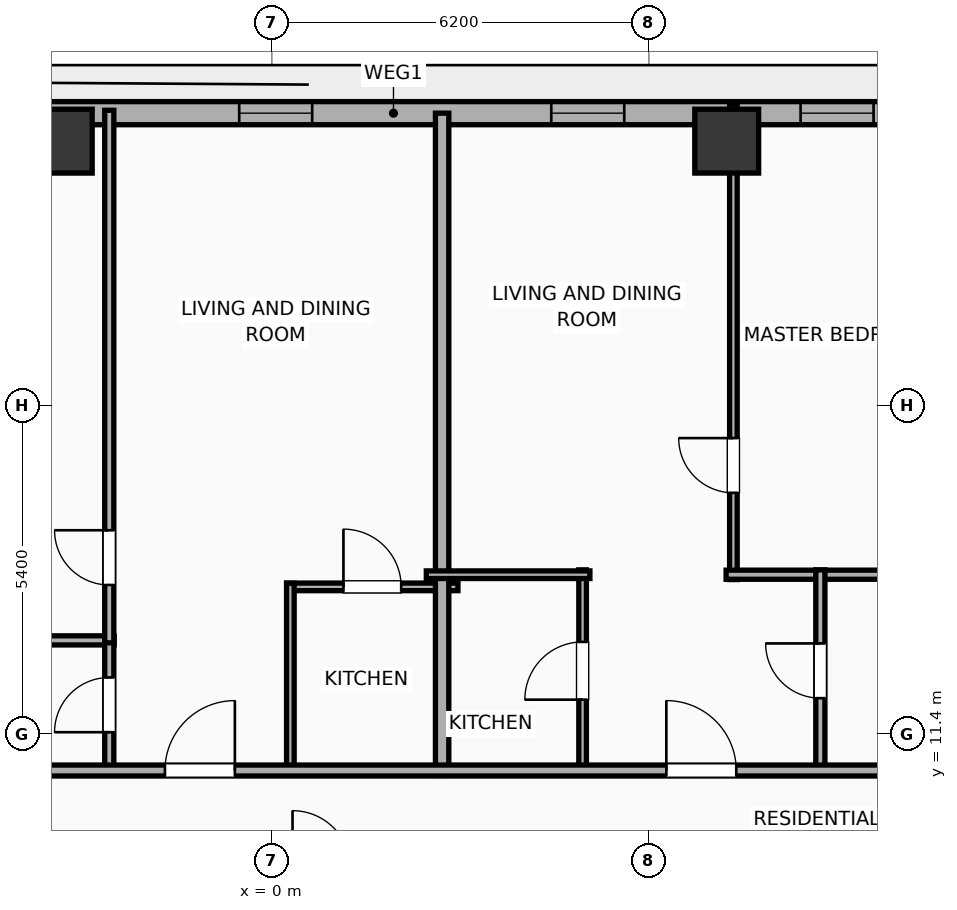
"""IFC4 building model, lengths in metres.
Left out: names, types, materials, properties, quantities, classifications, styles, units other than length and angle.
Written with IfcOpenShell. Run it as: python <this file> out.ifc"""

import sys

from ifc_helpers import new_model, si_unit, direction, frame, frame_2d, origin, origin_2d, place, context, subcontext, project, spatial, rectangle, hollow_rectangle, extrude, element, fill, save


model = new_model("IFC4")
c1 = context("Model", 3, precision=1e-05, world=origin(), true_north=direction((0.0, 1.0)))
c2 = subcontext(c1, "Body", "Model", "MODEL_VIEW")
j1 = project(units=[si_unit("LENGTHUNIT", "METRE"), si_unit("PLANEANGLEUNIT", "RADIAN")], contexts=[c1])
p1 = place(None, origin())
s1 = spatial("IfcSite", under=j1, at=p1, CompositionType="ELEMENT")
p2 = place(p1, origin())
s2 = spatial("IfcBuilding", under=s1, at=p2, CompositionType="ELEMENT")
p3 = place(p2, frame((0.0, 0.0, 85.8)))
s3 = spatial("IfcBuildingStorey", under=s2, at=p3, CompositionType="ELEMENT", Elevation=85.8)
for number, where, z_axis, x_axis in (
    (1, (7.48, 21.15, -0.4), (0.0, 0.0, 1.0), (1.0, 0.0, 0.0)),
    (2, (-3.48, 21.15, -0.4), (0.0, 0.0, 1.0), (1.0, 0.0, 0.0)),
):
    element("IfcColumn", number, at=place(p3, frame(where, z_axis=z_axis, x_axis=x_axis)), inside=s3, PredefinedType="COLUMN", context=c2, shape_type="SweptSolid", body=[
        extrude(hollow_rectangle(XDim=1.05, YDim=1.05, WallThickness=0.036, at=origin_2d()), origin(), (0.0, 0.0, 1.0), 4.3),
    ])
p4 = place(p3, frame((-25.381, 21.61, 0.0), z_axis=(0.0, 0.0, 1.0), x_axis=(1.0, 0.0, 0.0)))
e3 = element("IfcWall", 3, at=p4, inside=s3, PredefinedType="ELEMENTEDWALL", context=c2, shape_type="SweptSolid", body=[
    extrude(rectangle(XDim=54.763, YDim=0.38, at=frame_2d((27.381, 0.0))), origin(), (0.0, 0.0, 1.0), 2.54),
])
p5 = place(p4, frame((5.645, 0.0, 0.75)))
e4 = element("IfcOpeningElement", 4, at=p5, cuts=e3, PredefinedType="OPENING", context=c2, shape_type="SweptSolid", body=[
    extrude(rectangle(XDim=2.4, YDim=1.45, at=frame_2d((1.2, 0.725))), frame((0.0, 0.2, 0.0), z_axis=(0.0, -1.0, 0.0), x_axis=(1.0, 0.0, 0.0)), (0.0, 0.0, 1.0), 0.4),
])
p6 = place(p4, frame((47.567, 0.0, 0.75)))
e5 = element("IfcOpeningElement", 5, at=p6, cuts=e3, PredefinedType="OPENING", context=c2, shape_type="SweptSolid", body=[
    extrude(rectangle(XDim=2.4, YDim=1.45, at=frame_2d((1.2, 0.725))), frame((0.0, 0.2, 0.0), z_axis=(0.0, -1.0, 0.0), x_axis=(1.0, 0.0, 0.0)), (0.0, 0.0, 1.0), 0.4),
])
p7 = place(p4, frame((1.635, 0.0, 0.55)))
e6 = element("IfcOpeningElement", 6, at=p7, cuts=e3, PredefinedType="OPENING", context=c2, shape_type="SweptSolid", body=[
    extrude(rectangle(XDim=1.2, YDim=1.15, at=frame_2d((0.6, 0.575))), frame((0.0, 0.2, 0.0), z_axis=(0.0, -1.0, 0.0), x_axis=(1.0, 0.0, 0.0)), (0.0, 0.0, 1.0), 0.4),
])
p8 = place(p4, frame((8.996, 0.0, 0.55)))
e7 = element("IfcOpeningElement", 7, at=p8, cuts=e3, PredefinedType="OPENING", context=c2, shape_type="SweptSolid", body=[
    extrude(rectangle(XDim=1.2, YDim=1.15, at=frame_2d((0.6, 0.575))), frame((0.0, 0.2, 0.0), z_axis=(0.0, -1.0, 0.0), x_axis=(1.0, 0.0, 0.0)), (0.0, 0.0, 1.0), 0.4),
])
p9 = place(p4, frame((13.576, 0.0, 0.55)))
e8 = element("IfcOpeningElement", 8, at=p9, cuts=e3, PredefinedType="OPENING", context=c2, shape_type="SweptSolid", body=[
    extrude(rectangle(XDim=1.2, YDim=1.15, at=frame_2d((0.6, 0.575))), frame((0.0, 0.2, 0.0), z_axis=(0.0, -1.0, 0.0), x_axis=(1.0, 0.0, 0.0)), (0.0, 0.0, 1.0), 0.4),
])
p10 = place(p4, frame((17.676, 0.0, 0.55)))
e9 = element("IfcOpeningElement", 9, at=p10, cuts=e3, PredefinedType="OPENING", context=c2, shape_type="SweptSolid", body=[
    extrude(rectangle(XDim=1.2, YDim=1.15, at=frame_2d((0.6, 0.575))), frame((0.0, 0.2, 0.0), z_axis=(0.0, -1.0, 0.0), x_axis=(1.0, 0.0, 0.0)), (0.0, 0.0, 1.0), 0.4),
])
p11 = place(p4, frame((20.319, 0.0, 0.55)))
e10 = element("IfcOpeningElement", 10, at=p11, cuts=e3, PredefinedType="OPENING", context=c2, shape_type="SweptSolid", body=[
    extrude(rectangle(XDim=0.85, YDim=1.15, at=frame_2d((0.425, 0.575))), frame((0.0, 0.2, 0.0), z_axis=(0.0, -1.0, 0.0), x_axis=(1.0, 0.0, 0.0)), (0.0, 0.0, 1.0), 0.4),
])
p12 = place(p4, frame((24.844, 0.0, 0.55)))
e11 = element("IfcOpeningElement", 11, at=p12, cuts=e3, PredefinedType="OPENING", context=c2, shape_type="SweptSolid", body=[
    extrude(rectangle(XDim=1.2, YDim=1.15, at=frame_2d((0.6, 0.575))), frame((0.0, 0.2, 0.0), z_axis=(0.0, -1.0, 0.0), x_axis=(1.0, 0.0, 0.0)), (0.0, 0.0, 1.0), 0.4),
])
p13 = place(p4, frame((29.976, 0.0, 0.55)))
e12 = element("IfcOpeningElement", 12, at=p13, cuts=e3, PredefinedType="OPENING", context=c2, shape_type="SweptSolid", body=[
    extrude(rectangle(XDim=1.2, YDim=1.15, at=frame_2d((0.6, 0.575))), frame((0.0, 0.2, 0.0), z_axis=(0.0, -1.0, 0.0), x_axis=(1.0, 0.0, 0.0)), (0.0, 0.0, 1.0), 0.4),
])
p14 = place(p4, frame((34.076, 0.0, 0.55)))
e13 = element("IfcOpeningElement", 13, at=p14, cuts=e3, PredefinedType="OPENING", context=c2, shape_type="SweptSolid", body=[
    extrude(rectangle(XDim=1.2, YDim=1.15, at=frame_2d((0.6, 0.575))), frame((0.0, 0.2, 0.0), z_axis=(0.0, -1.0, 0.0), x_axis=(1.0, 0.0, 0.0)), (0.0, 0.0, 1.0), 0.4),
])
p15 = place(p4, frame((38.176, 0.0, 0.55)))
e14 = element("IfcOpeningElement", 14, at=p15, cuts=e3, PredefinedType="OPENING", context=c2, shape_type="SweptSolid", body=[
    extrude(rectangle(XDim=1.2, YDim=1.15, at=frame_2d((0.6, 0.575))), frame((0.0, 0.2, 0.0), z_axis=(0.0, -1.0, 0.0), x_axis=(1.0, 0.0, 0.0)), (0.0, 0.0, 1.0), 0.4),
])
p16 = place(p4, frame((41.796, 0.0, 0.55)))
e15 = element("IfcOpeningElement", 15, at=p16, cuts=e3, PredefinedType="OPENING", context=c2, shape_type="SweptSolid", body=[
    extrude(rectangle(XDim=1.2, YDim=1.15, at=frame_2d((0.6, 0.575))), frame((0.0, 0.2, 0.0), z_axis=(0.0, -1.0, 0.0), x_axis=(1.0, 0.0, 0.0)), (0.0, 0.0, 1.0), 0.4),
])
p17 = place(p4, frame((45.336, 0.0, 0.55)))
e16 = element("IfcOpeningElement", 16, at=p17, cuts=e3, PredefinedType="OPENING", context=c2, shape_type="SweptSolid", body=[
    extrude(rectangle(XDim=1.2, YDim=1.15, at=frame_2d((0.6, 0.575))), frame((0.0, 0.2, 0.0), z_axis=(0.0, -1.0, 0.0), x_axis=(1.0, 0.0, 0.0)), (0.0, 0.0, 1.0), 0.4),
])
p18 = place(p4, frame((53.022, 0.0, 0.55)))
e17 = element("IfcOpeningElement", 17, at=p18, cuts=e3, PredefinedType="OPENING", context=c2, shape_type="SweptSolid", body=[
    extrude(rectangle(XDim=0.85, YDim=1.15, at=frame_2d((0.425, 0.575))), frame((0.0, 0.2, 0.0), z_axis=(0.0, -1.0, 0.0), x_axis=(1.0, 0.0, 0.0)), (0.0, 0.0, 1.0), 0.4),
])
p19 = place(p3, frame((-5.66, 12.94, 0.0), z_axis=(0.0, 0.0, 1.0), x_axis=(1.0, 0.0, 0.0)))
e18 = element("IfcWall", 18, at=p19, inside=s3, PredefinedType="PLUMBINGWALL", context=c2, shape_type="SweptSolid", body=[
    extrude(rectangle(XDim=3.066, YDim=0.15, at=frame_2d((1.533, 0.0))), origin(), (0.0, 0.0, 1.0), 3.65),
])
p20 = place(p3, frame((-2.674, 10.78, 0.0), z_axis=(0.0, 0.0, 1.0), x_axis=(0.0, 1.0, 0.0)))
e19 = element("IfcWall", 19, at=p20, inside=s3, PredefinedType="PLUMBINGWALL", context=c2, shape_type="SweptSolid", body=[
    extrude(rectangle(XDim=2.2, YDim=0.15, at=frame_2d((1.1, 0.0))), origin(), (0.0, 0.0, 1.0), 3.65),
])
p21 = place(p20, frame((0.65, 0.0, 0.0)))
e20 = element("IfcOpeningElement", 20, at=p21, cuts=e19, PredefinedType="OPENING", context=c2, shape_type="SweptSolid", body=[
    extrude(rectangle(XDim=0.9, YDim=2.05, at=frame_2d((0.45, 1.025))), frame((0.0, 0.085, 0.0), z_axis=(0.0, -1.0, 0.0), x_axis=(1.0, 0.0, 0.0)), (0.0, 0.0, 1.0), 0.17),
])
p22 = place(p3, frame((-2.674, 12.9, 0.0), z_axis=(0.0, 0.0, 1.0), x_axis=(0.0, 1.0, 0.0)))
e21 = element("IfcWall", 21, at=p22, inside=s3, PredefinedType="PLUMBINGWALL", context=c2, shape_type="SweptSolid", body=[
    extrude(rectangle(XDim=8.758, YDim=0.15, at=frame_2d((4.379, 0.0))), origin(), (0.0, 0.0, 1.0), 3.65),
])
p23 = place(p22, frame((0.951, 0.0, 0.0)))
e22 = element("IfcOpeningElement", 22, at=p23, cuts=e21, PredefinedType="OPENING", context=c2, shape_type="SweptSolid", body=[
    extrude(rectangle(XDim=0.9, YDim=2.05, at=frame_2d((0.45, 1.025))), frame((0.0, 0.085, 0.0), z_axis=(0.0, -1.0, 0.0), x_axis=(1.0, 0.0, 0.0)), (0.0, 0.0, 1.0), 0.17),
])
p24 = place(p3, frame((0.244, 13.82, 0.0), z_axis=(0.0, 0.0, 1.0), x_axis=(1.0, 0.0, 0.0)))
e23 = element("IfcWall", 23, at=p24, inside=s3, PredefinedType="PARTITIONING", context=c2, shape_type="SweptSolid", body=[
    extrude(rectangle(XDim=2.816, YDim=0.125, at=frame_2d((1.408, 0.0))), origin(), (0.0, 0.0, 1.0), 3.65),
])
p25 = place(p24, frame((0.933, 0.0, 0.0)))
e24 = element("IfcOpeningElement", 24, at=p25, cuts=e23, PredefinedType="OPENING", context=c2, shape_type="SweptSolid", body=[
    extrude(rectangle(XDim=0.95, YDim=2.05, at=frame_2d((0.475, 1.025))), frame((0.0, 0.073, 0.0), z_axis=(0.0, -1.0, 0.0), x_axis=(1.0, 0.0, 0.0)), (0.0, 0.0, 1.0), 0.145),
])
p26 = place(p3, frame((0.304, 10.78, 0.0), z_axis=(0.0, 0.0, 1.0), x_axis=(0.0, 1.0, 0.0)))
e25 = element("IfcWall", 25, at=p26, inside=s3, PredefinedType="PARTITIONING", context=c2, shape_type="SweptSolid", body=[
    extrude(rectangle(XDim=3.1, YDim=0.125, at=frame_2d((1.55, 0.0))), origin(), (0.0, 0.0, 1.0), 3.65),
])
p27 = place(p3, frame((2.8, 10.72, 0.0), z_axis=(0.0, 0.0, 1.0), x_axis=(0.0, 1.0, 0.0)))
e26 = element("IfcWall", 26, at=p27, inside=s3, PredefinedType="PARTITIONING", context=c2, shape_type="SweptSolid", body=[
    extrude(rectangle(XDim=10.89, YDim=0.22, at=frame_2d((5.445, 0.0))), origin(), (0.0, 0.0, 1.0), 3.65),
])
p28 = place(p3, frame((7.59, 13.94, 0.0), z_axis=(0.0, 0.0, 1.0), x_axis=(0.0, 1.0, 0.0)))
e27 = element("IfcWall", 27, at=p28, inside=s3, PredefinedType="PARTITIONING", context=c2, shape_type="SweptSolid", body=[
    extrude(rectangle(XDim=7.82, YDim=0.125, at=frame_2d((3.91, 0.0))), origin(), (0.0, 0.0, 1.0), 2.54),
])
p29 = place(p28, frame((1.427, 0.0, 0.0)))
e28 = element("IfcOpeningElement", 28, at=p29, cuts=e27, PredefinedType="OPENING", context=c2, shape_type="SweptSolid", body=[
    extrude(rectangle(XDim=0.9, YDim=2.05, at=frame_2d((0.45, 1.025))), frame((0.0, 0.073, 0.0), z_axis=(0.0, -1.0, 0.0), x_axis=(1.0, 0.0, 0.0)), (0.0, 0.0, 1.0), 0.145),
])
p30 = place(p3, frame((7.47, 14.02, 0.0), z_axis=(0.0, 0.0, 1.0), x_axis=(1.0, 0.0, 0.0)))
e29 = element("IfcWall", 29, at=p30, inside=s3, PredefinedType="PLUMBINGWALL", context=c2, shape_type="SweptSolid", body=[
    extrude(rectangle(XDim=3.605, YDim=0.15, at=frame_2d((1.802, 0.0))), origin(), (0.0, 0.0, 1.0), 3.65),
])
p31 = place(p3, frame((5.11, 10.78, 0.0), z_axis=(0.0, 0.0, 1.0), x_axis=(0.0, 1.0, 0.0)))
e30 = element("IfcWall", 30, at=p31, inside=s3, PredefinedType="PARTITIONING", context=c2, shape_type="SweptSolid", body=[
    extrude(rectangle(XDim=3.32, YDim=0.125, at=frame_2d((1.66, 0.0))), origin(), (0.0, 0.0, 1.0), 2.54),
])
p32 = place(p31, frame((1.185, 0.0, 0.0)))
e31 = element("IfcOpeningElement", 31, at=p32, cuts=e30, PredefinedType="OPENING", context=c2, shape_type="SweptSolid", body=[
    extrude(rectangle(XDim=0.95, YDim=2.05, at=frame_2d((0.475, 1.025))), frame((0.0, 0.073, 0.0), z_axis=(0.0, -1.0, 0.0), x_axis=(1.0, 0.0, 0.0)), (0.0, 0.0, 1.0), 0.145),
])
p33 = place(p3, frame((2.54, 14.02, 0.0), z_axis=(0.0, 0.0, 1.0), x_axis=(1.0, 0.0, 0.0)))
e32 = element("IfcWall", 32, at=p33, inside=s3, PredefinedType="PARTITIONING", context=c2, shape_type="SweptSolid", body=[
    extrude(rectangle(XDim=2.69, YDim=0.125, at=frame_2d((1.345, 0.0))), origin(), (0.0, 0.0, 1.0), 3.65),
])
p34 = place(p3, frame((9.02, 10.78, 0.0), z_axis=(0.0, 0.0, 1.0), x_axis=(0.0, 1.0, 0.0)))
e33 = element("IfcWall", 33, at=p34, inside=s3, PredefinedType="PLUMBINGWALL", context=c2, shape_type="SweptSolid", body=[
    extrude(rectangle(XDim=3.32, YDim=0.15, at=frame_2d((1.66, 0.0))), origin(), (0.0, 0.0, 1.0), 3.65),
])
p35 = place(p34, frame((1.21, 0.0, 0.0)))
e34 = element("IfcOpeningElement", 34, at=p35, cuts=e33, PredefinedType="OPENING", context=c2, shape_type="SweptSolid", body=[
    extrude(rectangle(XDim=0.9, YDim=2.05, at=frame_2d((0.45, 1.025))), frame((0.0, 0.085, 0.0), z_axis=(0.0, -1.0, 0.0), x_axis=(1.0, 0.0, 0.0)), (0.0, 0.0, 1.0), 0.17),
])
p36 = place(p3, frame((-29.21, 10.8, 0.0), z_axis=(0.0, 0.0, 1.0), x_axis=(1.0, 0.0, 0.0)))
e35 = element("IfcWall", 35, at=p36, inside=s3, PredefinedType="PARTITIONING", context=c2, shape_type="SweptSolid", body=[
    extrude(rectangle(XDim=62.42, YDim=0.18, at=frame_2d((31.21, 0.0))), origin(), (0.0, 0.0, 1.0), 3.65),
])
p37 = place(p36, frame((3.264, 0.0, 0.0)))
e36 = element("IfcOpeningElement", 36, at=p37, cuts=e35, PredefinedType="OPENING", context=c2, shape_type="SweptSolid", body=[
    extrude(rectangle(XDim=1.15, YDim=2.05, at=frame_2d((0.575, 1.025))), frame((0.0, 0.1, 0.0), z_axis=(0.0, -1.0, 0.0), x_axis=(1.0, 0.0, 0.0)), (0.0, 0.0, 1.0), 0.2),
])
p38 = place(p36, frame((11.116, 0.0, 0.0)))
e37 = element("IfcOpeningElement", 37, at=p38, cuts=e35, PredefinedType="OPENING", context=c2, shape_type="SweptSolid", body=[
    extrude(rectangle(XDim=1.15, YDim=2.05, at=frame_2d((0.575, 1.025))), frame((0.0, 0.1, 0.0), z_axis=(0.0, -1.0, 0.0), x_axis=(1.0, 0.0, 0.0)), (0.0, 0.0, 1.0), 0.2),
])
p39 = place(p36, frame((19.3, 0.0, 0.0)))
e38 = element("IfcOpeningElement", 38, at=p39, cuts=e35, PredefinedType="OPENING", context=c2, shape_type="SweptSolid", body=[
    extrude(rectangle(XDim=1.15, YDim=2.05, at=frame_2d((0.575, 1.025))), frame((0.0, 0.1, 0.0), z_axis=(0.0, -1.0, 0.0), x_axis=(1.0, 0.0, 0.0)), (0.0, 0.0, 1.0), 0.2),
])
p40 = place(p36, frame((27.452, 0.0, 0.0)))
e39 = element("IfcOpeningElement", 39, at=p40, cuts=e35, PredefinedType="OPENING", context=c2, shape_type="SweptSolid", body=[
    extrude(rectangle(XDim=1.15, YDim=2.05, at=frame_2d((0.575, 1.025))), frame((0.0, 0.1, 0.0), z_axis=(0.0, -1.0, 0.0), x_axis=(1.0, 0.0, 0.0)), (0.0, 0.0, 1.0), 0.2),
])
p41 = place(p36, frame((35.697, 0.0, 0.0)))
e40 = element("IfcOpeningElement", 40, at=p41, cuts=e35, PredefinedType="OPENING", context=c2, shape_type="SweptSolid", body=[
    extrude(rectangle(XDim=1.15, YDim=2.05, at=frame_2d((0.575, 1.025))), frame((0.0, 0.1, 0.0), z_axis=(0.0, -1.0, 0.0), x_axis=(1.0, 0.0, 0.0)), (0.0, 0.0, 1.0), 0.2),
])
p42 = place(p36, frame((43.899, 0.0, 0.0)))
e41 = element("IfcOpeningElement", 41, at=p42, cuts=e35, PredefinedType="OPENING", context=c2, shape_type="SweptSolid", body=[
    extrude(rectangle(XDim=1.15, YDim=2.05, at=frame_2d((0.575, 1.025))), frame((0.0, 0.1, 0.0), z_axis=(0.0, -1.0, 0.0), x_axis=(1.0, 0.0, 0.0)), (0.0, 0.0, 1.0), 0.2),
])
p43 = place(p36, frame((51.599, 0.0, 0.0)))
e42 = element("IfcOpeningElement", 42, at=p43, cuts=e35, PredefinedType="OPENING", context=c2, shape_type="SweptSolid", body=[
    extrude(rectangle(XDim=1.15, YDim=2.05, at=frame_2d((0.575, 1.025))), frame((0.0, 0.1, 0.0), z_axis=(0.0, -1.0, 0.0), x_axis=(1.0, 0.0, 0.0)), (0.0, 0.0, 1.0), 0.2),
])
p44 = place(p36, frame((59.242, 0.0, 0.0)))
e43 = element("IfcOpeningElement", 43, at=p44, cuts=e35, PredefinedType="OPENING", context=c2, shape_type="SweptSolid", body=[
    extrude(rectangle(XDim=0.9, YDim=2.05, at=frame_2d((0.45, 1.025))), frame((0.0, 0.1, 0.0), z_axis=(0.0, -1.0, 0.0), x_axis=(1.0, 0.0, 0.0)), (0.0, 0.0, 1.0), 0.2),
])
p45 = place(p12, origin())
e44 = element("IfcWindow", 44, at=p45, inside=s3, PartitioningType="SINGLE_PANEL", PredefinedType="WINDOW", context=c2, shape_type="SweptSolid", body=[
    extrude(rectangle(XDim=1.2, YDim=1.15, at=frame_2d((0.6, 0.575))), frame((0.0, 0.03, 0.0), z_axis=(0.0, -1.0, 0.0), x_axis=(1.0, 0.0, 0.0)), (0.0, 0.0, 1.0), 0.06),
])
fill(e11, e44)
p46 = place(p13, origin())
e45 = element("IfcWindow", 45, at=p46, inside=s3, PartitioningType="SINGLE_PANEL", PredefinedType="WINDOW", context=c2, shape_type="SweptSolid", body=[
    extrude(rectangle(XDim=1.2, YDim=1.15, at=frame_2d((0.6, 0.575))), frame((0.0, 0.03, 0.0), z_axis=(0.0, -1.0, 0.0), x_axis=(1.0, 0.0, 0.0)), (0.0, 0.0, 1.0), 0.06),
])
fill(e12, e45)
p47 = place(p14, origin())
e46 = element("IfcWindow", 46, at=p47, inside=s3, PartitioningType="SINGLE_PANEL", PredefinedType="WINDOW", context=c2, shape_type="SweptSolid", body=[
    extrude(rectangle(XDim=1.2, YDim=1.15, at=frame_2d((0.6, 0.575))), frame((0.0, 0.03, 0.0), z_axis=(0.0, -1.0, 0.0), x_axis=(1.0, 0.0, 0.0)), (0.0, 0.0, 1.0), 0.06),
])
fill(e13, e46)
p48 = place(p21, origin())
e47 = element("IfcDoor", 47, at=p48, inside=s3, OperationType="SINGLE_SWING_LEFT", PredefinedType="DOOR", context=c2, shape_type="SweptSolid", body=[
    extrude(rectangle(XDim=0.9, YDim=2.05, at=frame_2d((0.45, 1.025))), frame((0.0, 0.025, 0.0), z_axis=(0.0, -1.0, 0.0), x_axis=(1.0, 0.0, 0.0)), (0.0, 0.0, 1.0), 0.05),
])
fill(e20, e47)
p49 = place(p23, origin())
e48 = element("IfcDoor", 48, at=p49, inside=s3, OperationType="SINGLE_SWING_RIGHT", PredefinedType="DOOR", context=c2, shape_type="SweptSolid", body=[
    extrude(rectangle(XDim=0.9, YDim=2.05, at=frame_2d((0.45, 1.025))), frame((0.0, 0.025, 0.0), z_axis=(0.0, -1.0, 0.0), x_axis=(1.0, 0.0, 0.0)), (0.0, 0.0, 1.0), 0.05),
])
fill(e22, e48)
p50 = place(p25, origin())
e49 = element("IfcDoor", 49, at=p50, inside=s3, OperationType="SINGLE_SWING_LEFT", PredefinedType="DOOR", context=c2, shape_type="SweptSolid", body=[
    extrude(rectangle(XDim=0.95, YDim=2.05, at=frame_2d((0.475, 1.025))), frame((0.0, 0.025, 0.0), z_axis=(0.0, -1.0, 0.0), x_axis=(1.0, 0.0, 0.0)), (0.0, 0.0, 1.0), 0.05),
])
fill(e24, e49)
p51 = place(p29, origin())
e50 = element("IfcDoor", 50, at=p51, inside=s3, OperationType="SINGLE_SWING_RIGHT", PredefinedType="DOOR", context=c2, shape_type="SweptSolid", body=[
    extrude(rectangle(XDim=0.9, YDim=2.05, at=frame_2d((0.45, 1.025))), frame((0.0, 0.025, 0.0), z_axis=(0.0, -1.0, 0.0), x_axis=(1.0, 0.0, 0.0)), (0.0, 0.0, 1.0), 0.05),
])
fill(e28, e50)
p52 = place(p32, origin())
e51 = element("IfcDoor", 51, at=p52, inside=s3, OperationType="SINGLE_SWING_LEFT", PredefinedType="DOOR", context=c2, shape_type="SweptSolid", body=[
    extrude(rectangle(XDim=0.95, YDim=2.05, at=frame_2d((0.475, 1.025))), frame((0.0, 0.025, 0.0), z_axis=(0.0, -1.0, 0.0), x_axis=(1.0, 0.0, 0.0)), (0.0, 0.0, 1.0), 0.05),
])
fill(e31, e51)
p53 = place(p35, origin())
e52 = element("IfcDoor", 52, at=p53, inside=s3, OperationType="SINGLE_SWING_RIGHT", PredefinedType="DOOR", context=c2, shape_type="SweptSolid", body=[
    extrude(rectangle(XDim=0.9, YDim=2.05, at=frame_2d((0.45, 1.025))), frame((0.0, 0.025, 0.0), z_axis=(0.0, -1.0, 0.0), x_axis=(1.0, 0.0, 0.0)), (0.0, 0.0, 1.0), 0.05),
])
fill(e34, e52)
p54 = place(p40, origin())
e53 = element("IfcDoor", 53, at=p54, inside=s3, OperationType="SINGLE_SWING_RIGHT", PredefinedType="DOOR", context=c2, shape_type="SweptSolid", body=[
    extrude(rectangle(XDim=1.15, YDim=2.05, at=frame_2d((0.575, 1.025))), frame((0.0, 0.025, 0.0), z_axis=(0.0, -1.0, 0.0), x_axis=(1.0, 0.0, 0.0)), (0.0, 0.0, 1.0), 0.05),
])
fill(e39, e53)
p55 = place(p41, origin())
e54 = element("IfcDoor", 54, at=p55, inside=s3, OperationType="SINGLE_SWING_LEFT", PredefinedType="DOOR", context=c2, shape_type="SweptSolid", body=[
    extrude(rectangle(XDim=1.15, YDim=2.05, at=frame_2d((0.575, 1.025))), frame((0.0, 0.025, 0.0), z_axis=(0.0, -1.0, 0.0), x_axis=(1.0, 0.0, 0.0)), (0.0, 0.0, 1.0), 0.05),
])
fill(e40, e54)
save(model, sys.argv[1])
